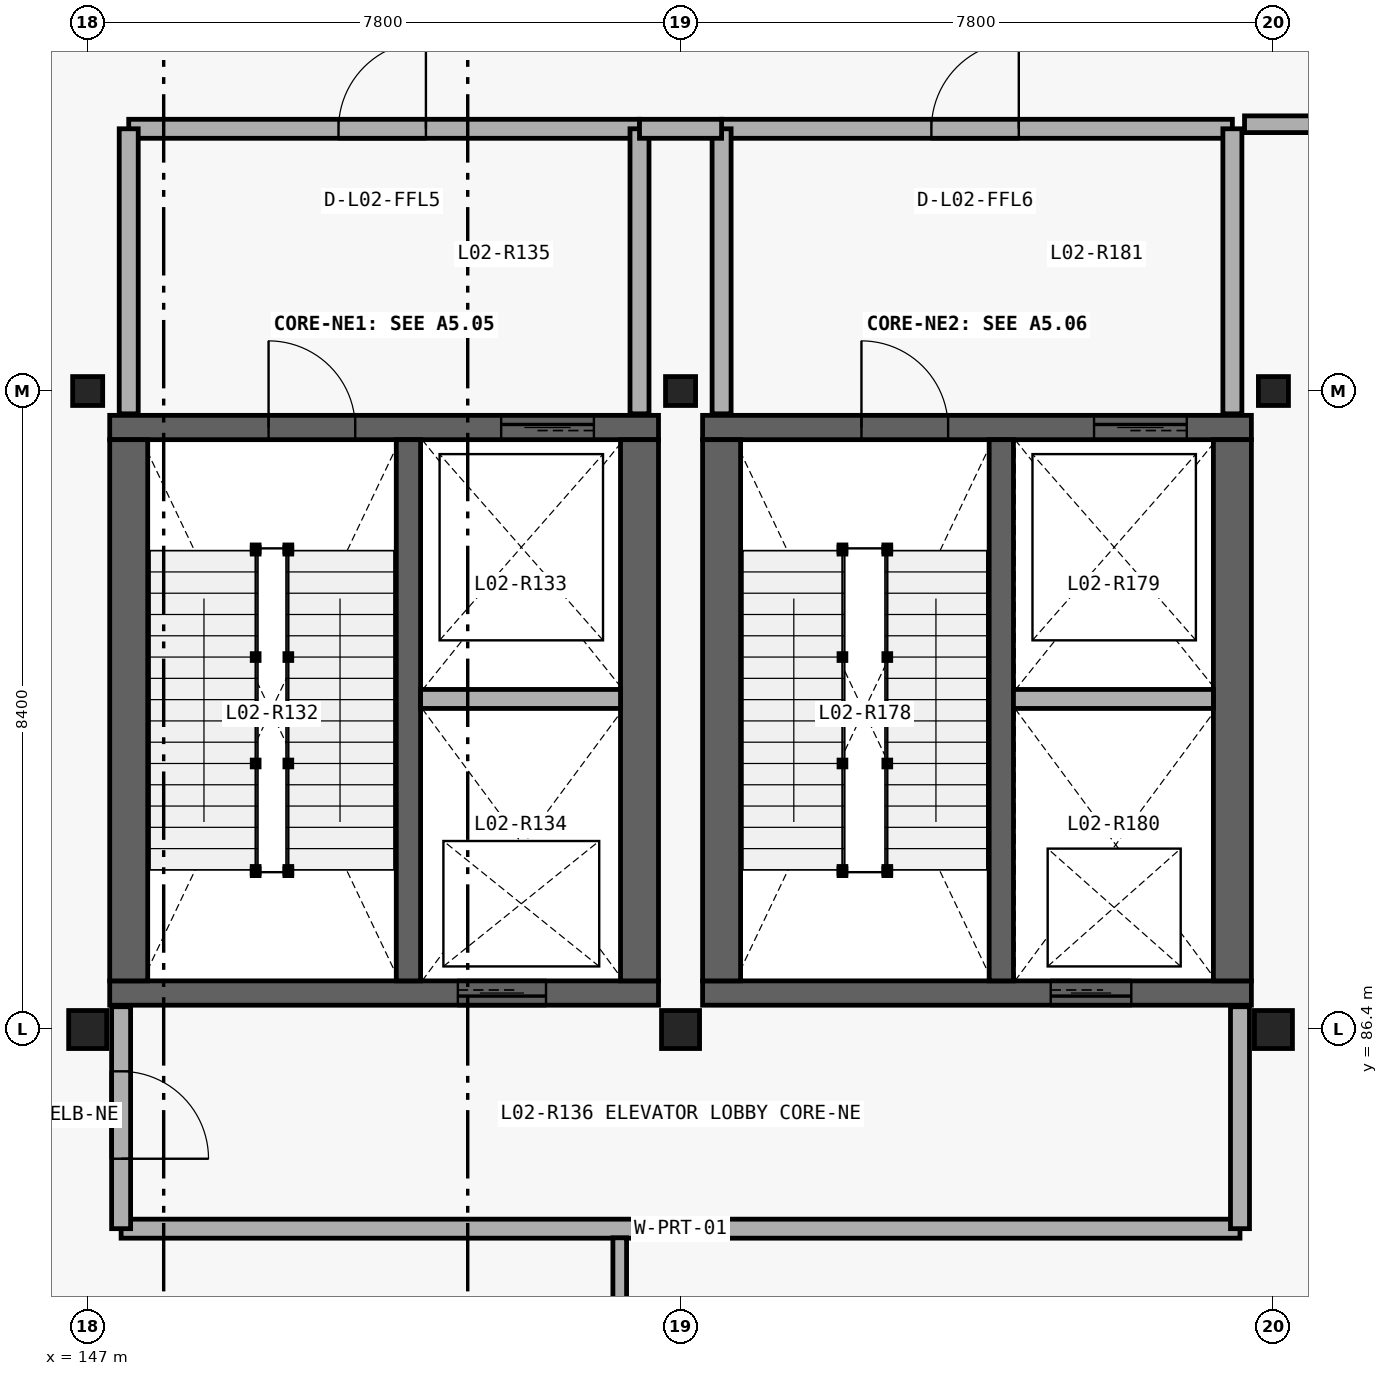
"""IFC4 building model, lengths in metres.
Left out: names, types, materials, properties, quantities, classifications, styles, units other than length and angle.
Written with IfcOpenShell. Run it as: python <this file> out.ifc"""

import sys

from ifc_helpers import new_model, si_unit, direction, frame, frame_2d, origin_with_axes, origin_2d_with_axis, place, context, subcontext, project, spatial, rectangle, i_section, extrude, element, fill, save


model = new_model("IFC4")
c1 = context("Model", 3, precision=1e-05, world=origin_with_axes(), true_north=direction((0.0, 1.0)))
c2 = subcontext(c1, "Body", "Model", "MODEL_VIEW")
j1 = project(units=[si_unit("LENGTHUNIT", "METRE"), si_unit("PLANEANGLEUNIT", "RADIAN")], contexts=[c1])
p1 = place(None, origin_with_axes())
s1 = spatial("IfcSite", under=j1, at=p1, CompositionType="ELEMENT")
p2 = place(p1, origin_with_axes())
s2 = spatial("IfcBuilding", under=s1, at=p2, CompositionType="ELEMENT")
p3 = place(p2, frame((0.0, 0.0, 10.8), z_axis=(0.0, 0.0, 1.0), x_axis=(1.0, 0.0, 0.0)))
s3 = spatial("IfcBuildingStorey", under=s2, at=p3, CompositionType="ELEMENT", Elevation=10.8)
p4 = place(None, frame((147.29, 86.88, 10.8), z_axis=(0.0, 0.0, 1.0), x_axis=(1.0, 0.0, 0.0)))
e1 = element("IfcWall", 1, at=p4, inside=s3, PredefinedType="SHEAR", context=c2, shape_type="SweptSolid", body=[
    extrude(rectangle(XDim=7.22, YDim=0.32, at=frame_2d((3.61, 0.0), x_axis=(1.0, 0.0))), origin_with_axes(), (0.0, 0.0, 1.0), 4.8),
])
p5 = place(None, frame((152.45, 86.88, 10.8), z_axis=(0.0, 0.0, 1.0), x_axis=(1.0, 0.0, 0.0)))
e2 = element("IfcOpeningElement", 2, at=p5, cuts=e1, PredefinedType="OPENING", context=c2, shape_type="SweptSolid", body=[
    extrude(rectangle(XDim=1.16, YDim=2.2, at=frame_2d((0.0, 1.1), x_axis=(1.0, 0.0))), frame((0.0, 0.17, 0.0), z_axis=(0.0, -1.0, 0.0), x_axis=(1.0, 0.0, 0.0)), (0.0, 0.0, 1.0), 0.34),
])
p6 = place(None, frame((154.51, 94.32, 10.8), z_axis=(0.0, 0.0, 1.0), x_axis=(-1.0, 0.0, 0.0)))
e3 = element("IfcWall", 3, at=p6, inside=s3, PredefinedType="SHEAR", context=c2, shape_type="SweptSolid", body=[
    extrude(rectangle(XDim=7.22, YDim=0.32, at=frame_2d((3.61, 0.0), x_axis=(1.0, 0.0))), origin_with_axes(), (0.0, 0.0, 1.0), 4.8),
])
p7 = place(None, frame((149.95, 94.32, 10.8), z_axis=(0.0, 0.0, 1.0), x_axis=(-1.0, 0.0, 0.0)))
e4 = element("IfcOpeningElement", 4, at=p7, cuts=e3, PredefinedType="OPENING", context=c2, shape_type="SweptSolid", body=[
    extrude(rectangle(XDim=1.14, YDim=2.18, at=frame_2d((0.0, 1.09), x_axis=(1.0, 0.0))), frame((0.0, 0.17, 0.0), z_axis=(0.0, -1.0, 0.0), x_axis=(1.0, 0.0, 0.0)), (0.0, 0.0, 1.0), 0.34),
])
p8 = place(None, frame((153.05, 94.32, 10.8), z_axis=(0.0, 0.0, 1.0), x_axis=(-1.0, 0.0, 0.0)))
e5 = element("IfcOpeningElement", 5, at=p8, cuts=e3, PredefinedType="OPENING", context=c2, shape_type="SweptSolid", body=[
    extrude(rectangle(XDim=1.22, YDim=2.28, at=frame_2d((0.0, 1.14), x_axis=(1.0, 0.0))), frame((0.0, 0.17, 0.0), z_axis=(0.0, -1.0, 0.0), x_axis=(1.0, 0.0, 0.0)), (0.0, 0.0, 1.0), 0.34),
])
for number, where, z_axis, x_axis in (
    (6, (154.26, 87.04, 10.8), (0.0, 0.0, 1.0), (0.0, 1.0, 0.0)),
    (7, (147.54, 94.16, 10.8), (0.0, 0.0, 1.0), (0.0, -1.0, 0.0)),
):
    element("IfcWall", number, at=place(None, frame(where, z_axis=z_axis, x_axis=x_axis)), inside=s3, PredefinedType="SHEAR", context=c2, shape_type="SweptSolid", body=[
        extrude(rectangle(XDim=7.12, YDim=0.5, at=frame_2d((3.56, 0.0), x_axis=(1.0, 0.0))), origin_with_axes(), (0.0, 0.0, 1.0), 4.8),
    ])
p9 = place(None, frame((151.22, 87.04, 10.8), z_axis=(0.0, 0.0, 1.0), x_axis=(0.0, 1.0, 0.0)))
e8 = element("IfcWall", 8, at=p9, inside=s3, PredefinedType="SHEAR", context=c2, shape_type="SweptSolid", body=[
    extrude(rectangle(XDim=7.12, YDim=0.32, at=frame_2d((3.56, 0.0), x_axis=(1.0, 0.0))), origin_with_axes(), (0.0, 0.0, 1.0), 4.8),
])
p10 = place(None, frame((151.38, 90.749, 10.8), z_axis=(0.0, 0.0, 1.0), x_axis=(1.0, 0.0, 0.0)))
e9 = element("IfcWall", 9, at=p10, inside=s3, PredefinedType="PARTITIONING", context=c2, shape_type="SweptSolid", body=[
    extrude(rectangle(XDim=2.63, YDim=0.25, at=frame_2d((1.315, 0.0), x_axis=(1.0, 0.0))), origin_with_axes(), (0.0, 0.0, 1.0), 4.44),
])
p11 = place(None, frame((154.26, 98.25, 10.8), z_axis=(0.0, 0.0, 1.0), x_axis=(-1.0, 0.0, 0.0)))
e10 = element("IfcWall", 10, at=p11, inside=s3, PredefinedType="PARTITIONING", context=c2, shape_type="SweptSolid", body=[
    extrude(rectangle(XDim=6.72, YDim=0.25, at=frame_2d((3.36, 0.0), x_axis=(1.0, 0.0))), origin_with_axes(), (0.0, 0.0, 1.0), 4.44),
])
p12 = place(None, frame((150.875, 98.25, 10.8), z_axis=(0.0, 0.0, 1.0), x_axis=(-1.0, 0.0, 0.0)))
e11 = element("IfcOpeningElement", 11, at=p12, cuts=e10, PredefinedType="OPENING", context=c2, shape_type="SweptSolid", body=[
    extrude(rectangle(XDim=1.15, YDim=2.25, at=frame_2d((0.0, 1.125), x_axis=(1.0, 0.0))), frame((0.0, 0.135, 0.0), z_axis=(0.0, -1.0, 0.0), x_axis=(1.0, 0.0, 0.0)), (0.0, 0.0, 1.0), 0.27),
])
for number, where, z_axis, x_axis in (
    (12, (147.54, 94.5, 10.8), (0.0, 0.0, 1.0), (0.0, 1.0, 0.0)),
    (13, (154.26, 94.5, 10.8), (0.0, 0.0, 1.0), (0.0, 1.0, 0.0)),
):
    element("IfcWall", number, at=place(None, frame(where, z_axis=z_axis, x_axis=x_axis)), inside=s3, PredefinedType="PARTITIONING", context=c2, shape_type="SweptSolid", body=[
        extrude(rectangle(XDim=3.75, YDim=0.25, at=frame_2d((1.875, 0.0), x_axis=(1.0, 0.0))), origin_with_axes(), (0.0, 0.0, 1.0), 4.44),
    ])
p13 = place(None, frame((147.44, 83.78, 10.8), z_axis=(0.0, 0.0, 1.0), x_axis=(1.0, 0.0, 0.0)))
e14 = element("IfcWall", 14, at=p13, inside=s3, PredefinedType="PARTITIONING", context=c2, shape_type="SweptSolid", body=[
    extrude(rectangle(XDim=14.72, YDim=0.25, at=frame_2d((7.36, 0.0), x_axis=(1.0, 0.0))), origin_with_axes(), (0.0, 0.0, 1.0), 3.97),
])
p14 = place(None, frame((162.16, 83.78, 10.8), z_axis=(0.0, 0.0, 1.0), x_axis=(0.0, 1.0, 0.0)))
e15 = element("IfcWall", 15, at=p14, inside=s3, PredefinedType="PARTITIONING", context=c2, shape_type="SweptSolid", body=[
    extrude(rectangle(XDim=2.92, YDim=0.25, at=frame_2d((1.46, 0.0), x_axis=(1.0, 0.0))), origin_with_axes(), (0.0, 0.0, 1.0), 4.44),
])
p15 = place(None, frame((147.44, 86.7, 10.8), z_axis=(0.0, 0.0, 1.0), x_axis=(0.0, -1.0, 0.0)))
e16 = element("IfcWall", 16, at=p15, inside=s3, PredefinedType="PARTITIONING", context=c2, shape_type="SweptSolid", body=[
    extrude(rectangle(XDim=2.92, YDim=0.25, at=frame_2d((1.46, 0.0), x_axis=(1.0, 0.0))), origin_with_axes(), (0.0, 0.0, 1.0), 4.44),
])
p16 = place(None, frame((147.44, 85.275, 10.8), z_axis=(0.0, 0.0, 1.0), x_axis=(0.0, -1.0, 0.0)))
e17 = element("IfcOpeningElement", 17, at=p16, cuts=e16, PredefinedType="OPENING", context=c2, shape_type="SweptSolid", body=[
    extrude(rectangle(XDim=1.15, YDim=2.25, at=frame_2d((0.0, 1.125), x_axis=(1.0, 0.0))), frame((0.0, 0.135, 0.0), z_axis=(0.0, -1.0, 0.0), x_axis=(1.0, 0.0, 0.0)), (0.0, 0.0, 1.0), 0.27),
])
p17 = place(None, frame((155.09, 86.88, 10.8), z_axis=(0.0, 0.0, 1.0), x_axis=(1.0, 0.0, 0.0)))
e18 = element("IfcWall", 18, at=p17, inside=s3, PredefinedType="SHEAR", context=c2, shape_type="SweptSolid", body=[
    extrude(rectangle(XDim=7.22, YDim=0.32, at=frame_2d((3.61, 0.0), x_axis=(1.0, 0.0))), origin_with_axes(), (0.0, 0.0, 1.0), 4.8),
])
p18 = place(None, frame((160.2, 86.88, 10.8), z_axis=(0.0, 0.0, 1.0), x_axis=(1.0, 0.0, 0.0)))
e19 = element("IfcOpeningElement", 19, at=p18, cuts=e18, PredefinedType="OPENING", context=c2, shape_type="SweptSolid", body=[
    extrude(rectangle(XDim=1.06, YDim=2.16, at=frame_2d((0.0, 1.08), x_axis=(1.0, 0.0))), frame((0.0, 0.17, 0.0), z_axis=(0.0, -1.0, 0.0), x_axis=(1.0, 0.0, 0.0)), (0.0, 0.0, 1.0), 0.34),
])
p19 = place(None, frame((162.31, 94.32, 10.8), z_axis=(0.0, 0.0, 1.0), x_axis=(-1.0, 0.0, 0.0)))
e20 = element("IfcWall", 20, at=p19, inside=s3, PredefinedType="SHEAR", context=c2, shape_type="SweptSolid", body=[
    extrude(rectangle(XDim=7.22, YDim=0.32, at=frame_2d((3.61, 0.0), x_axis=(1.0, 0.0))), origin_with_axes(), (0.0, 0.0, 1.0), 4.8),
])
p20 = place(None, frame((157.75, 94.32, 10.8), z_axis=(0.0, 0.0, 1.0), x_axis=(-1.0, 0.0, 0.0)))
e21 = element("IfcOpeningElement", 21, at=p20, cuts=e20, PredefinedType="OPENING", context=c2, shape_type="SweptSolid", body=[
    extrude(rectangle(XDim=1.14, YDim=2.18, at=frame_2d((0.0, 1.09), x_axis=(1.0, 0.0))), frame((0.0, 0.17, 0.0), z_axis=(0.0, -1.0, 0.0), x_axis=(1.0, 0.0, 0.0)), (0.0, 0.0, 1.0), 0.34),
])
p21 = place(None, frame((160.85, 94.32, 10.8), z_axis=(0.0, 0.0, 1.0), x_axis=(-1.0, 0.0, 0.0)))
e22 = element("IfcOpeningElement", 22, at=p21, cuts=e20, PredefinedType="OPENING", context=c2, shape_type="SweptSolid", body=[
    extrude(rectangle(XDim=1.22, YDim=2.28, at=frame_2d((0.0, 1.14), x_axis=(1.0, 0.0))), frame((0.0, 0.17, 0.0), z_axis=(0.0, -1.0, 0.0), x_axis=(1.0, 0.0, 0.0)), (0.0, 0.0, 1.0), 0.34),
])
for number, where, z_axis, x_axis in (
    (23, (162.06, 87.04, 10.8), (0.0, 0.0, 1.0), (0.0, 1.0, 0.0)),
    (24, (155.34, 94.16, 10.8), (0.0, 0.0, 1.0), (0.0, -1.0, 0.0)),
):
    element("IfcWall", number, at=place(None, frame(where, z_axis=z_axis, x_axis=x_axis)), inside=s3, PredefinedType="SHEAR", context=c2, shape_type="SweptSolid", body=[
        extrude(rectangle(XDim=7.12, YDim=0.5, at=frame_2d((3.56, 0.0), x_axis=(1.0, 0.0))), origin_with_axes(), (0.0, 0.0, 1.0), 4.8),
    ])
p22 = place(None, frame((159.02, 87.04, 10.8), z_axis=(0.0, 0.0, 1.0), x_axis=(0.0, 1.0, 0.0)))
e25 = element("IfcWall", 25, at=p22, inside=s3, PredefinedType="SHEAR", context=c2, shape_type="SweptSolid", body=[
    extrude(rectangle(XDim=7.12, YDim=0.32, at=frame_2d((3.56, 0.0), x_axis=(1.0, 0.0))), origin_with_axes(), (0.0, 0.0, 1.0), 4.8),
])
p23 = place(None, frame((159.18, 90.749, 10.8), z_axis=(0.0, 0.0, 1.0), x_axis=(1.0, 0.0, 0.0)))
e26 = element("IfcWall", 26, at=p23, inside=s3, PredefinedType="PARTITIONING", context=c2, shape_type="SweptSolid", body=[
    extrude(rectangle(XDim=2.63, YDim=0.25, at=frame_2d((1.315, 0.0), x_axis=(1.0, 0.0))), origin_with_axes(), (0.0, 0.0, 1.0), 4.44),
])
p24 = place(None, frame((162.06, 98.25, 10.8), z_axis=(0.0, 0.0, 1.0), x_axis=(-1.0, 0.0, 0.0)))
e27 = element("IfcWall", 27, at=p24, inside=s3, PredefinedType="PARTITIONING", context=c2, shape_type="SweptSolid", body=[
    extrude(rectangle(XDim=6.72, YDim=0.25, at=frame_2d((3.36, 0.0), x_axis=(1.0, 0.0))), origin_with_axes(), (0.0, 0.0, 1.0), 4.44),
])
p25 = place(None, frame((158.675, 98.25, 10.8), z_axis=(0.0, 0.0, 1.0), x_axis=(-1.0, 0.0, 0.0)))
e28 = element("IfcOpeningElement", 28, at=p25, cuts=e27, PredefinedType="OPENING", context=c2, shape_type="SweptSolid", body=[
    extrude(rectangle(XDim=1.15, YDim=2.25, at=frame_2d((0.0, 1.125), x_axis=(1.0, 0.0))), frame((0.0, 0.135, 0.0), z_axis=(0.0, -1.0, 0.0), x_axis=(1.0, 0.0, 0.0)), (0.0, 0.0, 1.0), 0.27),
])
for number, where, z_axis, x_axis in (
    (29, (155.34, 94.5, 10.8), (0.0, 0.0, 1.0), (0.0, 1.0, 0.0)),
    (30, (162.06, 94.5, 10.8), (0.0, 0.0, 1.0), (0.0, 1.0, 0.0)),
):
    element("IfcWall", number, at=place(None, frame(where, z_axis=z_axis, x_axis=x_axis)), inside=s3, PredefinedType="PARTITIONING", context=c2, shape_type="SweptSolid", body=[
        extrude(rectangle(XDim=3.75, YDim=0.25, at=frame_2d((1.875, 0.0), x_axis=(1.0, 0.0))), origin_with_axes(), (0.0, 0.0, 1.0), 4.44),
    ])
p26 = place(None, frame((154.26, 98.25, 10.8), z_axis=(0.0, 0.0, 1.0), x_axis=(1.0, 0.0, 0.0)))
e31 = element("IfcWall", 31, at=p26, inside=s3, PredefinedType="PARTITIONING", context=c2, shape_type="SweptSolid", body=[
    extrude(rectangle(XDim=1.08, YDim=0.25, at=frame_2d((0.54, 0.0), x_axis=(1.0, 0.0))), origin_with_axes(), (0.0, 0.0, 1.0), 4.44),
])
p27 = place(None, frame((162.22, 98.31, 10.8), z_axis=(0.0, 0.0, 1.0), x_axis=(1.0, 0.0, 0.0)))
e32 = element("IfcWall", 32, at=p27, inside=s3, PredefinedType="PARTITIONING", context=c2, shape_type="SweptSolid", body=[
    extrude(rectangle(XDim=7.04, YDim=0.22, at=frame_2d((3.52, 0.0), x_axis=(1.0, 0.0))), origin_with_axes(), (0.0, 0.0, 1.0), 4.44),
])
p28 = place(None, frame((164.242, 98.31, 10.8), z_axis=(0.0, 0.0, 1.0), x_axis=(1.0, 0.0, 0.0)))
e33 = element("IfcOpeningElement", 33, at=p28, cuts=e32, PredefinedType="OPENING", context=c2, shape_type="SweptSolid", body=[
    extrude(rectangle(XDim=1.56, YDim=2.28, at=frame_2d((0.0, 1.14), x_axis=(1.0, 0.0))), frame((0.0, 0.12, 0.0), z_axis=(0.0, -1.0, 0.0), x_axis=(1.0, 0.0, 0.0)), (0.0, 0.0, 1.0), 0.24),
])
p29 = place(None, frame((167.438, 98.31, 10.8), z_axis=(0.0, 0.0, 1.0), x_axis=(1.0, 0.0, 0.0)))
e34 = element("IfcOpeningElement", 34, at=p29, cuts=e32, PredefinedType="OPENING", context=c2, shape_type="SweptSolid", body=[
    extrude(rectangle(XDim=0.91, YDim=2.12, at=frame_2d((0.0, 1.06), x_axis=(1.0, 0.0))), frame((0.0, 0.12, 0.0), z_axis=(0.0, -1.0, 0.0), x_axis=(1.0, 0.0, 0.0)), (0.0, 0.0, 1.0), 0.24),
])
p30 = place(None, frame((154.0, 69.74, 10.8), z_axis=(0.0, 0.0, 1.0), x_axis=(0.0, 1.0, 0.0)))
e35 = element("IfcWall", 35, at=p30, inside=s3, PredefinedType="PARTITIONING", context=c2, shape_type="SweptSolid", body=[
    extrude(rectangle(XDim=13.92, YDim=0.18, at=frame_2d((6.96, 0.0), x_axis=(1.0, 0.0))), origin_with_axes(), (0.0, 0.0, 1.0), 4.44),
])
p31 = place(None, frame((147.0, 86.4, 10.8), z_axis=(0.0, 0.0, 1.0), x_axis=(1.0, 0.0, 0.0)))
e36 = element("IfcColumn", 36, at=p31, inside=s3, PredefinedType="COLUMN", context=c2, shape_type="SweptSolid", body=[
    extrude(i_section(OverallWidth=0.5, OverallDepth=0.5, WebThickness=0.022, FlangeThickness=0.036, at=origin_2d_with_axis()), origin_with_axes(), (0.0, 0.0, 1.0), 4.8),
])
p32 = place(None, frame((147.0, 94.8, 10.8), z_axis=(0.0, 0.0, 1.0), x_axis=(1.0, 0.0, 0.0)))
e37 = element("IfcColumn", 37, at=p32, inside=s3, PredefinedType="COLUMN", context=c2, shape_type="SweptSolid", body=[
    extrude(i_section(OverallWidth=0.395, OverallDepth=0.38, WebThickness=0.019, FlangeThickness=0.03, at=origin_2d_with_axis()), origin_with_axes(), (0.0, 0.0, 1.0), 4.8),
])
p33 = place(None, frame((154.8, 86.4, 10.8), z_axis=(0.0, 0.0, 1.0), x_axis=(1.0, 0.0, 0.0)))
e38 = element("IfcColumn", 38, at=p33, inside=s3, PredefinedType="COLUMN", context=c2, shape_type="SweptSolid", body=[
    extrude(i_section(OverallWidth=0.5, OverallDepth=0.5, WebThickness=0.022, FlangeThickness=0.036, at=origin_2d_with_axis()), origin_with_axes(), (0.0, 0.0, 1.0), 4.8),
])
p34 = place(None, frame((154.8, 94.8, 10.8), z_axis=(0.0, 0.0, 1.0), x_axis=(1.0, 0.0, 0.0)))
e39 = element("IfcColumn", 39, at=p34, inside=s3, PredefinedType="COLUMN", context=c2, shape_type="SweptSolid", body=[
    extrude(i_section(OverallWidth=0.395, OverallDepth=0.38, WebThickness=0.019, FlangeThickness=0.03, at=origin_2d_with_axis()), origin_with_axes(), (0.0, 0.0, 1.0), 4.8),
])
p35 = place(None, frame((162.6, 86.4, 10.8), z_axis=(0.0, 0.0, 1.0), x_axis=(1.0, 0.0, 0.0)))
e40 = element("IfcColumn", 40, at=p35, inside=s3, PredefinedType="COLUMN", context=c2, shape_type="SweptSolid", body=[
    extrude(i_section(OverallWidth=0.5, OverallDepth=0.5, WebThickness=0.022, FlangeThickness=0.036, at=origin_2d_with_axis()), origin_with_axes(), (0.0, 0.0, 1.0), 4.8),
])
p36 = place(None, frame((162.6, 94.8, 10.8), z_axis=(0.0, 0.0, 1.0), x_axis=(1.0, 0.0, 0.0)))
e41 = element("IfcColumn", 41, at=p36, inside=s3, PredefinedType="COLUMN", context=c2, shape_type="SweptSolid", body=[
    extrude(i_section(OverallWidth=0.395, OverallDepth=0.38, WebThickness=0.019, FlangeThickness=0.03, at=origin_2d_with_axis()), origin_with_axes(), (0.0, 0.0, 1.0), 4.8),
])
p37 = place(None, frame((149.95, 94.32, 10.8), z_axis=(0.0, 0.0, 1.0), x_axis=(1.0, 0.0, 0.0)))
e42 = element("IfcDoor", 42, at=p37, inside=s3, OperationType="SINGLE_SWING_RIGHT", PredefinedType="DOOR", context=c2, shape_type="SweptSolid", body=[
    extrude(rectangle(XDim=1.14, YDim=2.18, at=frame_2d((0.0, 1.09), x_axis=(1.0, 0.0))), frame((0.0, 0.04, 0.0), z_axis=(0.0, -1.0, 0.0), x_axis=(1.0, 0.0, 0.0)), (0.0, 0.0, 1.0), 0.08),
])
fill(e4, e42)
p38 = place(None, frame((153.05, 94.32, 10.8), z_axis=(0.0, 0.0, 1.0), x_axis=(1.0, 0.0, 0.0)))
e43 = element("IfcDoor", 43, at=p38, inside=s3, OperationType="SLIDING_TO_LEFT", PredefinedType="DOOR", context=c2, shape_type="SweptSolid", body=[
    extrude(rectangle(XDim=1.22, YDim=2.28, at=frame_2d((0.0, 1.14), x_axis=(1.0, 0.0))), frame((0.0, 0.04, 0.0), z_axis=(0.0, -1.0, 0.0), x_axis=(1.0, 0.0, 0.0)), (0.0, 0.0, 1.0), 0.08),
])
fill(e5, e43)
p39 = place(None, frame((152.45, 86.88, 10.8), z_axis=(0.0, 0.0, 1.0), x_axis=(-1.0, 0.0, 0.0)))
e44 = element("IfcDoor", 44, at=p39, inside=s3, OperationType="SLIDING_TO_LEFT", PredefinedType="DOOR", context=c2, shape_type="SweptSolid", body=[
    extrude(rectangle(XDim=1.16, YDim=2.2, at=frame_2d((0.0, 1.1), x_axis=(1.0, 0.0))), frame((0.0, 0.04, 0.0), z_axis=(0.0, -1.0, 0.0), x_axis=(1.0, 0.0, 0.0)), (0.0, 0.0, 1.0), 0.08),
])
fill(e2, e44)
p40 = place(None, frame((150.875, 98.25, 10.8), z_axis=(0.0, 0.0, 1.0), x_axis=(1.0, 0.0, 0.0)))
e45 = element("IfcDoor", 45, at=p40, inside=s3, OperationType="SINGLE_SWING_LEFT", PredefinedType="DOOR", context=c2, shape_type="SweptSolid", body=[
    extrude(rectangle(XDim=1.15, YDim=2.25, at=frame_2d((0.0, 1.125), x_axis=(1.0, 0.0))), frame((0.0, 0.04, 0.0), z_axis=(0.0, -1.0, 0.0), x_axis=(1.0, 0.0, 0.0)), (0.0, 0.0, 1.0), 0.08),
])
fill(e11, e45)
p41 = place(None, frame((147.44, 85.275, 10.8), z_axis=(0.0, 0.0, 1.0), x_axis=(0.0, -1.0, 0.0)))
e46 = element("IfcDoor", 46, at=p41, inside=s3, OperationType="SINGLE_SWING_RIGHT", PredefinedType="DOOR", context=c2, shape_type="SweptSolid", body=[
    extrude(rectangle(XDim=1.15, YDim=2.25, at=frame_2d((0.0, 1.125), x_axis=(1.0, 0.0))), frame((0.0, 0.04, 0.0), z_axis=(0.0, -1.0, 0.0), x_axis=(1.0, 0.0, 0.0)), (0.0, 0.0, 1.0), 0.08),
])
fill(e17, e46)
p42 = place(None, frame((157.75, 94.32, 10.8), z_axis=(0.0, 0.0, 1.0), x_axis=(1.0, 0.0, 0.0)))
e47 = element("IfcDoor", 47, at=p42, inside=s3, OperationType="SINGLE_SWING_RIGHT", PredefinedType="DOOR", context=c2, shape_type="SweptSolid", body=[
    extrude(rectangle(XDim=1.14, YDim=2.18, at=frame_2d((0.0, 1.09), x_axis=(1.0, 0.0))), frame((0.0, 0.04, 0.0), z_axis=(0.0, -1.0, 0.0), x_axis=(1.0, 0.0, 0.0)), (0.0, 0.0, 1.0), 0.08),
])
fill(e21, e47)
p43 = place(None, frame((160.85, 94.32, 10.8), z_axis=(0.0, 0.0, 1.0), x_axis=(1.0, 0.0, 0.0)))
e48 = element("IfcDoor", 48, at=p43, inside=s3, OperationType="SLIDING_TO_LEFT", PredefinedType="DOOR", context=c2, shape_type="SweptSolid", body=[
    extrude(rectangle(XDim=1.22, YDim=2.28, at=frame_2d((0.0, 1.14), x_axis=(1.0, 0.0))), frame((0.0, 0.04, 0.0), z_axis=(0.0, -1.0, 0.0), x_axis=(1.0, 0.0, 0.0)), (0.0, 0.0, 1.0), 0.08),
])
fill(e22, e48)
p44 = place(None, frame((160.2, 86.88, 10.8), z_axis=(0.0, 0.0, 1.0), x_axis=(-1.0, 0.0, 0.0)))
e49 = element("IfcDoor", 49, at=p44, inside=s3, OperationType="SLIDING_TO_LEFT", PredefinedType="DOOR", context=c2, shape_type="SweptSolid", body=[
    extrude(rectangle(XDim=1.06, YDim=2.16, at=frame_2d((0.0, 1.08), x_axis=(1.0, 0.0))), frame((0.0, 0.04, 0.0), z_axis=(0.0, -1.0, 0.0), x_axis=(1.0, 0.0, 0.0)), (0.0, 0.0, 1.0), 0.08),
])
fill(e19, e49)
p45 = place(None, frame((158.675, 98.25, 10.8), z_axis=(0.0, 0.0, 1.0), x_axis=(1.0, 0.0, 0.0)))
e50 = element("IfcDoor", 50, at=p45, inside=s3, OperationType="SINGLE_SWING_LEFT", PredefinedType="DOOR", context=c2, shape_type="SweptSolid", body=[
    extrude(rectangle(XDim=1.15, YDim=2.25, at=frame_2d((0.0, 1.125), x_axis=(1.0, 0.0))), frame((0.0, 0.04, 0.0), z_axis=(0.0, -1.0, 0.0), x_axis=(1.0, 0.0, 0.0)), (0.0, 0.0, 1.0), 0.08),
])
fill(e28, e50)
save(model, sys.argv[1])
